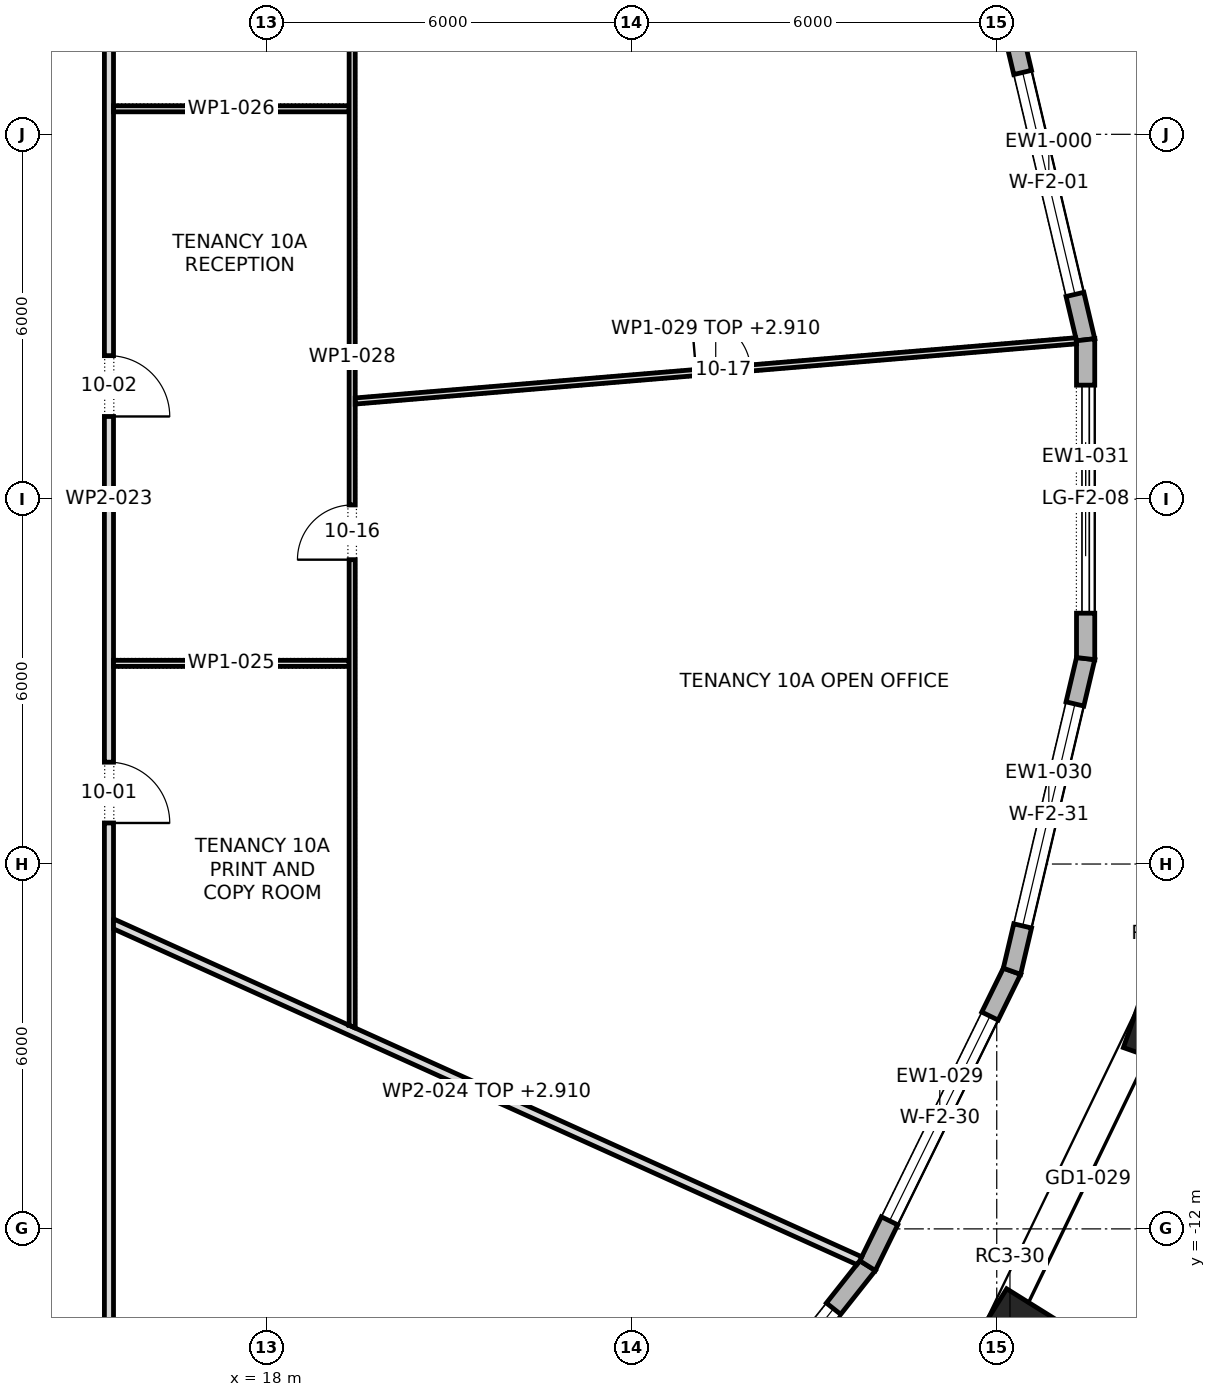
"""IFC4 building model, lengths in metres.
Left out: names, types, materials, properties, quantities, classifications, styles, units other than length and angle.
Written with IfcOpenShell. Run it as: python <this file> out.ifc"""

import sys

from ifc_helpers import new_model, si_unit, direction, frame, frame_2d, origin, origin_2d, place, context, subcontext, project, spatial, polyline, rectangle, outline, extrude, element, fill, save


model = new_model("IFC4")
c1 = context("Model", 3, precision=1e-05, world=origin(), true_north=direction((0.0, 1.0)))
c2 = subcontext(c1, "Body", "Model", "MODEL_VIEW")
j1 = project(units=[si_unit("LENGTHUNIT", "METRE"), si_unit("PLANEANGLEUNIT", "RADIAN")], contexts=[c1])
p1 = place(None, origin())
s1 = spatial("IfcSite", under=j1, at=p1, CompositionType="ELEMENT")
p2 = place(p1, origin())
s2 = spatial("IfcBuilding", under=s1, at=p2, CompositionType="ELEMENT")
p3 = place(p2, frame((0.0, 0.0, 142.3)))
s3 = spatial("IfcBuildingStorey", under=s2, at=p3, CompositionType="ELEMENT", Elevation=142.3)
for number, where, z_axis, x_axis in (
    (1, (30.217, -13.844, 0.0), (0.0, 0.0, 1.0), (0.529, 0.849, 0.0)),
    (2, (32.788, -8.525, 0.0), (0.0, 0.0, 1.0), (0.334, 0.943, 0.0)),
):
    element("IfcColumn", number, at=place(p3, frame(where, z_axis=z_axis, x_axis=x_axis)), inside=s3, PredefinedType="COLUMN", context=c2, shape_type="SweptSolid", body=[
        extrude(rectangle(XDim=1.4, YDim=1.0, at=origin_2d()), origin(), (0.0, 0.0, 1.0), 4.2),
    ])
p4 = place(p3, frame((31.462, 2.622, 0.0), z_axis=(0.0, 0.0, 1.0), x_axis=(-0.229289208312, 0.973358340464, 0.0)))
e3 = element("IfcWall", 3, at=p4, inside=s3, PredefinedType="STANDARD", context=c2, shape_type="SweptSolid", body=[
    extrude(outline(polyline([(-0.017, -0.15), (5.299, -0.15), (5.265, 0.15), (0.017, 0.15), (-0.017, -0.15)])), origin(), (0.0, 0.0, 1.0), 3.9),
])
p5 = place(p4, frame((0.766, 0.0, 0.6)))
e4 = element("IfcOpeningElement", 4, at=p5, cuts=e3, PredefinedType="OPENING", context=c2, shape_type="SweptSolid", body=[
    extrude(rectangle(XDim=3.75, YDim=2.85, at=frame_2d((1.875, 1.425))), frame((0.0, 0.162, 0.0), z_axis=(0.0, -1.0, 0.0), x_axis=(1.0, 0.0, 0.0)), (0.0, 0.0, 1.0), 0.324),
])
p6 = place(p3, frame((24.43, -16.96, 0.0), z_axis=(0.0, 0.0, 1.0), x_axis=(0.620520511988, 0.784190215574, 0.0)))
e5 = element("IfcWall", 5, at=p6, inside=s3, PredefinedType="STANDARD", context=c2, shape_type="SweptSolid", body=[
    extrude(outline(polyline([(-0.015, -0.15), (5.57, -0.15), (5.537, 0.15), (0.015, 0.15), (-0.015, -0.15)])), origin(), (0.0, 0.0, 1.0), 3.9),
])
p7 = place(p6, frame((0.902, 0.0, 0.6)))
e6 = element("IfcOpeningElement", 6, at=p7, cuts=e5, PredefinedType="OPENING", context=c2, shape_type="SweptSolid", body=[
    extrude(rectangle(XDim=3.75, YDim=2.85, at=frame_2d((1.875, 1.425))), frame((0.0, 0.162, 0.0), z_axis=(0.0, -1.0, 0.0), x_axis=(1.0, 0.0, 0.0)), (0.0, 0.0, 1.0), 0.324),
])
p8 = place(p3, frame((27.876, -12.605, 0.0), z_axis=(0.0, 0.0, 1.0), x_axis=(0.440373354088, 0.897814740918, 0.0)))
e7 = element("IfcWall", 7, at=p8, inside=s3, PredefinedType="STANDARD", context=c2, shape_type="SweptSolid", body=[
    extrude(outline(polyline([(-0.016, -0.15), (5.409, -0.15), (5.376, 0.15), (0.016, 0.15), (-0.016, -0.15)])), origin(), (0.0, 0.0, 1.0), 3.9),
])
p9 = place(p8, frame((0.821, 0.0, 0.6)))
e8 = element("IfcOpeningElement", 8, at=p9, cuts=e7, PredefinedType="OPENING", context=c2, shape_type="SweptSolid", body=[
    extrude(rectangle(XDim=3.75, YDim=2.85, at=frame_2d((1.875, 1.425))), frame((0.0, 0.162, 0.0), z_axis=(0.0, -1.0, 0.0), x_axis=(1.0, 0.0, 0.0)), (0.0, 0.0, 1.0), 0.324),
])
p10 = place(p3, frame((30.25, -7.763, 0.0), z_axis=(0.0, 0.0, 1.0), x_axis=(0.229289208312, 0.973358340464, 0.0)))
e9 = element("IfcWall", 9, at=p10, inside=s3, PredefinedType="STANDARD", context=c2, shape_type="SweptSolid", body=[
    extrude(outline(polyline([(-0.017, -0.15), (5.3, -0.15), (5.265, 0.15), (0.017, 0.15), (-0.017, -0.15)])), origin(), (0.0, 0.0, 1.0), 3.9),
])
p11 = place(p10, frame((0.766, 0.0, 0.6)))
e10 = element("IfcOpeningElement", 10, at=p11, cuts=e9, PredefinedType="OPENING", context=c2, shape_type="SweptSolid", body=[
    extrude(rectangle(XDim=3.75, YDim=2.85, at=frame_2d((1.875, 1.425))), frame((0.0, 0.162, 0.0), z_axis=(0.0, -1.0, 0.0), x_axis=(1.0, 0.0, 0.0)), (0.0, 0.0, 1.0), 0.324),
])
p12 = place(p3, frame((31.462, -2.622, 0.0), z_axis=(0.0, 0.0, 1.0), x_axis=(0.0, 1.0, 0.0)))
e11 = element("IfcWall", 11, at=p12, inside=s3, PredefinedType="STANDARD", context=c2, shape_type="SweptSolid", body=[
    extrude(outline(polyline([(-0.017, -0.15), (5.26, -0.15), (5.226, 0.15), (0.017, 0.15), (-0.017, -0.15)])), origin(), (0.0, 0.0, 1.0), 3.9),
])
p13 = place(p12, frame((0.747, 0.0, 0.0)))
e12 = element("IfcOpeningElement", 12, at=p13, cuts=e11, PredefinedType="OPENING", context=c2, shape_type="SweptSolid", body=[
    extrude(rectangle(XDim=3.75, YDim=3.45, at=frame_2d((1.875, 1.725))), frame((0.0, 0.162, 0.0), z_axis=(0.0, -1.0, 0.0), x_axis=(1.0, 0.0, 0.0)), (0.0, 0.0, 1.0), 0.324),
])
p14 = place(p3, frame((15.4, -15.475, 0.0), z_axis=(0.0, 0.0, 1.0), x_axis=(0.0, 1.0, 0.0)))
e13 = element("IfcWall", 13, at=p14, inside=s3, PredefinedType="PARTITIONING", context=c2, shape_type="SweptSolid", body=[
    extrude(outline(polyline([(0.0, -0.075), (1.935, -0.075), (3.869, -0.075), (5.803, -0.075), (7.738, -0.075), (9.672, -0.075), (11.606, -0.075), (13.541, -0.075), (15.475, -0.075), (17.409, -0.075), (19.344, -0.075), (21.278, -0.075), (23.212, -0.075), (25.147, -0.075), (27.081, -0.075), (29.016, -0.075), (30.95, -0.075), (30.8, 0.075), (28.885, 0.075), (26.969, 0.075), (25.053, 0.075), (23.138, 0.075), (21.222, 0.075), (19.306, 0.075), (17.391, 0.075), (15.475, 0.075), (13.56, 0.075), (11.644, 0.075), (9.728, 0.075), (7.812, 0.075), (5.897, 0.075), (3.981, 0.075), (2.066, 0.075), (0.15, 0.075), (0.0, -0.075)])), origin(), (0.0, 0.0, 1.0), 3.9),
])
p15 = place(p14, frame((10.15, 0.0, 0.0)))
e14 = element("IfcOpeningElement", 14, at=p15, cuts=e13, PredefinedType="OPENING", context=c2, shape_type="SweptSolid", body=[
    extrude(rectangle(XDim=1.0, YDim=2.1, at=frame_2d((0.5, 1.05))), frame((0.0, 0.087, 0.0), z_axis=(0.0, -1.0, 0.0), x_axis=(1.0, 0.0, 0.0)), (0.0, 0.0, 1.0), 0.174),
])
p16 = place(p14, frame((16.835, 0.0, 0.0)))
e15 = element("IfcOpeningElement", 15, at=p16, cuts=e13, PredefinedType="OPENING", context=c2, shape_type="SweptSolid", body=[
    extrude(rectangle(XDim=1.0, YDim=2.1, at=frame_2d((0.5, 1.05))), frame((0.0, 0.087, 0.0), z_axis=(0.0, -1.0, 0.0), x_axis=(1.0, 0.0, 0.0)), (0.0, 0.0, 1.0), 0.174),
])
p17 = place(p14, frame((23.52, 0.0, 0.0)))
e16 = element("IfcOpeningElement", 16, at=p17, cuts=e13, PredefinedType="OPENING", context=c2, shape_type="SweptSolid", body=[
    extrude(rectangle(XDim=1.0, YDim=2.1, at=frame_2d((0.5, 1.05))), frame((0.0, 0.087, 0.0), z_axis=(0.0, -1.0, 0.0), x_axis=(1.0, 0.0, 0.0)), (0.0, 0.0, 1.0), 0.174),
])
p18 = place(p3, frame((15.444, -6.97, 0.0), z_axis=(0.0, 0.0, 1.0), x_axis=(0.911349155517, -0.411634202587, 0.0)))
e17 = element("IfcWall", 17, at=p18, inside=s3, PredefinedType="PARTITIONING", context=c2, shape_type="SweptSolid", body=[
    extrude(outline(polyline([(0.068, -0.075), (1.984, -0.075), (3.9, -0.075), (5.816, -0.075), (7.732, -0.075), (9.648, -0.075), (11.564, -0.075), (13.48, -0.075), (13.5, 0.003), (13.501, 0.062), (13.501, 0.075), (11.652, 0.075), (9.802, 0.075), (7.953, 0.075), (6.103, 0.075), (4.253, 0.075), (4.252, 0.074), (4.252, 0.075), (2.835, 0.075), (1.417, 0.075), (0.0, 0.075), (0.068, -0.075)])), origin(), (0.0, 0.0, 1.0), 2.91),
])
for number, where, z_axis, x_axis in (
    (18, (15.475, -2.7, 0.0), (0.0, 0.0, 1.0), (1.0, 0.0, 0.0)),
    (19, (15.475, 6.42, 0.0), (0.0, 0.0, 1.0), (1.0, 0.0, 0.0)),
):
    element("IfcWall", number, at=place(p3, frame(where, z_axis=z_axis, x_axis=x_axis)), inside=s3, PredefinedType="PARTITIONING", context=c2, shape_type="SweptSolid", body=[
        extrude(rectangle(XDim=3.875, YDim=0.1, at=frame_2d((1.938, 0.0))), origin(), (0.0, 0.0, 1.0), 3.9),
    ])
p19 = place(p3, frame((19.4, -8.697, 0.0), z_axis=(0.0, 0.0, 1.0), x_axis=(0.0, 1.0, 0.0)))
e20 = element("IfcWall", 20, at=p19, inside=s3, PredefinedType="PARTITIONING", context=c2, shape_type="SweptSolid", body=[
    extrude(outline(polyline([(22.08, -0.05), (22.08, -0.05), (22.01, 0.05), (20.3, 0.05), (18.589, 0.05), (16.877, 0.05), (15.167, 0.05), (15.167, 0.05), (15.067, 0.05), (15.067, 0.05), (13.262, 0.05), (11.458, 0.05), (9.655, 0.05), (7.851, 0.05), (6.047, 0.05), (6.047, 0.05), (5.947, 0.05), (5.947, 0.05), (3.979, 0.05), (2.012, 0.05), (0.045, 0.05), (0.0, -0.049), (0.0, -0.05), (1.84, -0.05), (3.68, -0.05), (5.52, -0.05), (7.36, -0.05), (9.2, -0.05), (11.04, -0.05), (12.88, -0.05), (14.72, -0.05), (16.56, -0.05), (18.4, -0.05), (20.24, -0.05), (22.08, -0.05)])), origin(), (0.0, 0.0, 1.0), 3.9),
])
p20 = place(p19, frame((7.701, 0.0, 0.0)))
e21 = element("IfcOpeningElement", 21, at=p20, cuts=e20, PredefinedType="OPENING", context=c2, shape_type="SweptSolid", body=[
    extrude(rectangle(XDim=0.9, YDim=2.1, at=frame_2d((0.45, 1.05))), frame((0.0, 0.062, 0.0), z_axis=(0.0, -1.0, 0.0), x_axis=(1.0, 0.0, 0.0)), (0.0, 0.0, 1.0), 0.124),
])
p21 = place(p3, frame((19.446, 1.614, 0.0), z_axis=(0.0, 0.0, 1.0), x_axis=(0.996528479526, 0.083252564492, 0.0)))
e22 = element("IfcWall", 22, at=p21, inside=s3, PredefinedType="PARTITIONING", context=c2, shape_type="SweptSolid", body=[
    extrude(outline(polyline([(0.0, -0.05), (1.984, -0.05), (3.968, -0.05), (5.952, -0.05), (7.935, -0.05), (9.919, -0.05), (11.903, -0.05), (11.903, -0.05), (11.903, 0.027), (11.9, 0.05), (9.918, 0.05), (7.936, 0.05), (5.954, 0.05), (3.972, 0.05), (1.99, 0.05), (0.008, 0.05), (0.0, -0.05)])), origin(), (0.0, 0.0, 1.0), 2.91),
])
p22 = place(p21, frame((5.63, 0.0, 0.0)))
e23 = element("IfcOpeningElement", 23, at=p22, cuts=e22, PredefinedType="OPENING", context=c2, shape_type="SweptSolid", body=[
    extrude(rectangle(XDim=0.9, YDim=2.1, at=frame_2d((0.45, 1.05))), frame((0.0, 0.062, 0.0), z_axis=(0.0, -1.0, 0.0), x_axis=(1.0, 0.0, 0.0)), (0.0, 0.0, 1.0), 0.124),
])
p23 = place(p5, origin())
e24 = element("IfcWindow", 24, at=p23, inside=s3, PartitioningType="TRIPLE_PANEL_VERTICAL", PredefinedType="WINDOW", context=c2, shape_type="SweptSolid", body=[
    extrude(rectangle(XDim=3.75, YDim=2.85, at=frame_2d((1.875, 1.425))), frame((0.0, 0.03, 0.0), z_axis=(0.0, -1.0, 0.0), x_axis=(1.0, 0.0, 0.0)), (0.0, 0.0, 1.0), 0.06),
])
fill(e4, e24)
p24 = place(p7, origin())
e25 = element("IfcWindow", 25, at=p24, inside=s3, PartitioningType="TRIPLE_PANEL_VERTICAL", PredefinedType="WINDOW", context=c2, shape_type="SweptSolid", body=[
    extrude(rectangle(XDim=3.75, YDim=2.85, at=frame_2d((1.875, 1.425))), frame((0.0, 0.03, 0.0), z_axis=(0.0, -1.0, 0.0), x_axis=(1.0, 0.0, 0.0)), (0.0, 0.0, 1.0), 0.06),
])
fill(e6, e25)
p25 = place(p9, origin())
e26 = element("IfcWindow", 26, at=p25, inside=s3, PartitioningType="TRIPLE_PANEL_VERTICAL", PredefinedType="WINDOW", context=c2, shape_type="SweptSolid", body=[
    extrude(rectangle(XDim=3.75, YDim=2.85, at=frame_2d((1.875, 1.425))), frame((0.0, 0.03, 0.0), z_axis=(0.0, -1.0, 0.0), x_axis=(1.0, 0.0, 0.0)), (0.0, 0.0, 1.0), 0.06),
])
fill(e8, e26)
p26 = place(p11, origin())
e27 = element("IfcWindow", 27, at=p26, inside=s3, PartitioningType="TRIPLE_PANEL_VERTICAL", PredefinedType="WINDOW", context=c2, shape_type="SweptSolid", body=[
    extrude(rectangle(XDim=3.75, YDim=2.85, at=frame_2d((1.875, 1.425))), frame((0.0, 0.03, 0.0), z_axis=(0.0, -1.0, 0.0), x_axis=(1.0, 0.0, 0.0)), (0.0, 0.0, 1.0), 0.06),
])
fill(e10, e27)
p27 = place(p13, origin())
e28 = element("IfcDoor", 28, at=p27, inside=s3, OperationType="DOUBLE_DOOR_SLIDING", PredefinedType="DOOR", context=c2, shape_type="SweptSolid", body=[
    extrude(rectangle(XDim=3.75, YDim=3.45, at=frame_2d((1.875, 1.725))), frame((0.0, 0.025, 0.0), z_axis=(0.0, -1.0, 0.0), x_axis=(1.0, 0.0, 0.0)), (0.0, 0.0, 1.0), 0.05),
])
fill(e12, e28)
p28 = place(p15, frame((1.0, 0.0, 0.0), z_axis=(0.0, 0.0, 1.0), x_axis=(-1.0, 0.0, 0.0)))
e29 = element("IfcDoor", 29, at=p28, inside=s3, OperationType="SINGLE_SWING_LEFT", PredefinedType="DOOR", context=c2, shape_type="SweptSolid", body=[
    extrude(rectangle(XDim=1.0, YDim=2.1, at=frame_2d((0.5, 1.05))), frame((0.0, 0.025, 0.0), z_axis=(0.0, -1.0, 0.0), x_axis=(1.0, 0.0, 0.0)), (0.0, 0.0, 1.0), 0.05),
])
fill(e14, e29)
p29 = place(p16, frame((1.0, 0.0, 0.0), z_axis=(0.0, 0.0, 1.0), x_axis=(-1.0, 0.0, 0.0)))
e30 = element("IfcDoor", 30, at=p29, inside=s3, OperationType="SINGLE_SWING_LEFT", PredefinedType="DOOR", context=c2, shape_type="SweptSolid", body=[
    extrude(rectangle(XDim=1.0, YDim=2.1, at=frame_2d((0.5, 1.05))), frame((0.0, 0.025, 0.0), z_axis=(0.0, -1.0, 0.0), x_axis=(1.0, 0.0, 0.0)), (0.0, 0.0, 1.0), 0.05),
])
fill(e15, e30)
p30 = place(p20, origin())
e31 = element("IfcDoor", 31, at=p30, inside=s3, OperationType="SINGLE_SWING_RIGHT", PredefinedType="DOOR", context=c2, shape_type="SweptSolid", body=[
    extrude(rectangle(XDim=0.9, YDim=2.1, at=frame_2d((0.45, 1.05))), frame((0.0, 0.025, 0.0), z_axis=(0.0, -1.0, 0.0), x_axis=(1.0, 0.0, 0.0)), (0.0, 0.0, 1.0), 0.05),
])
fill(e21, e31)
p31 = place(p22, origin())
e32 = element("IfcDoor", 32, at=p31, inside=s3, OperationType="SINGLE_SWING_RIGHT", PredefinedType="DOOR", context=c2, shape_type="SweptSolid", body=[
    extrude(rectangle(XDim=0.9, YDim=2.1, at=frame_2d((0.45, 1.05))), frame((0.0, 0.025, 0.0), z_axis=(0.0, -1.0, 0.0), x_axis=(1.0, 0.0, 0.0)), (0.0, 0.0, 1.0), 0.05),
])
fill(e23, e32)
save(model, sys.argv[1])
